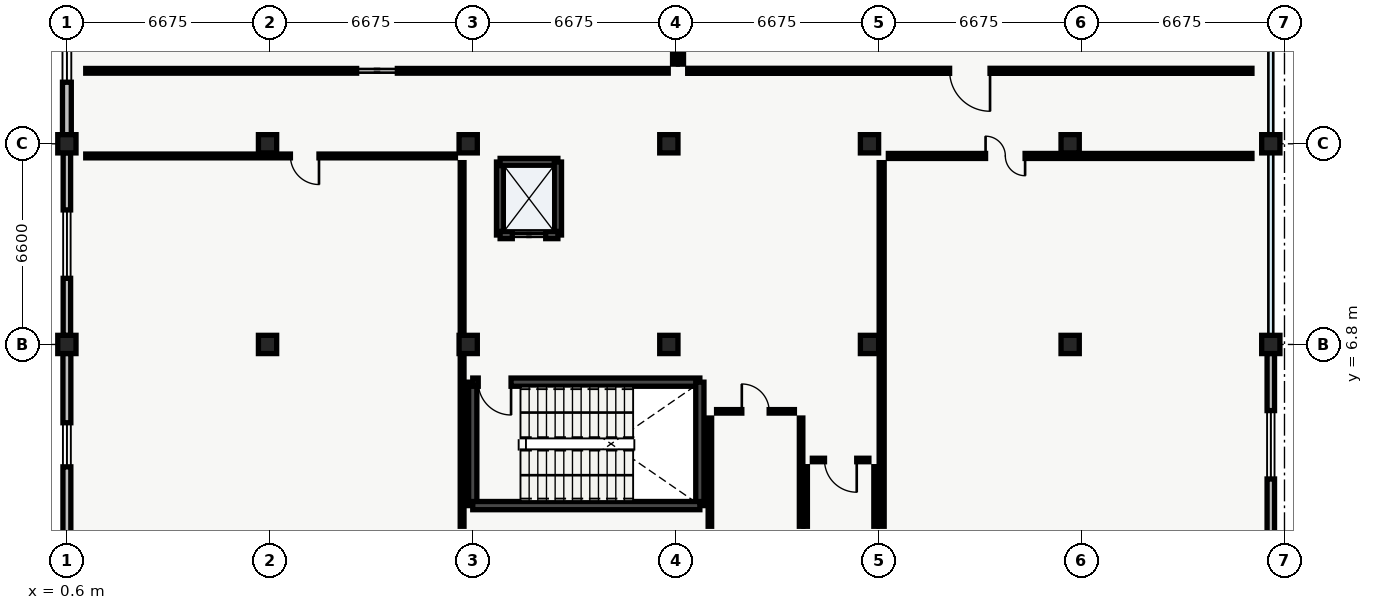
"""IFC4 building model, lengths in metres.
Left out: names, types, materials, properties, quantities, classifications, styles, units other than length and angle.
Written with IfcOpenShell. Run it as: python <this file> out.ifc"""

import sys

from ifc_helpers import new_model, si_unit, direction, frame, frame_2d, origin, origin_2d, place, context, subcontext, project, spatial, rectangle, extrude, element, fill, save


model = new_model("IFC4")
c1 = context("Model", 3, precision=1e-05, world=origin(), true_north=direction((0.0, 1.0)))
c2 = subcontext(c1, "Body", "Model", "MODEL_VIEW")
j1 = project(units=[si_unit("LENGTHUNIT", "METRE"), si_unit("PLANEANGLEUNIT", "RADIAN")], contexts=[c1])
p1 = place(None, origin())
s1 = spatial("IfcSite", under=j1, at=p1, CompositionType="ELEMENT")
p2 = place(p1, origin())
s2 = spatial("IfcBuilding", under=s1, at=p2, CompositionType="ELEMENT")
p3 = place(p2, frame((0.0, 0.0, 5.1)))
s3 = spatial("IfcBuildingStorey", under=s2, at=p3, CompositionType="ELEMENT", Elevation=5.1)
for number, where, z_axis, x_axis in (
    (1, (0.6, 6.8, 0.0), (0.0, 0.0, 1.0), (1.0, 0.0, 0.0)),
    (2, (0.6, 13.4, 0.0), (0.0, 0.0, 1.0), (1.0, 0.0, 0.0)),
    (3, (7.2, 6.8, 0.0), (0.0, 0.0, 1.0), (1.0, 0.0, 0.0)),
    (4, (7.2, 13.4, 0.0), (0.0, 0.0, 1.0), (1.0, 0.0, 0.0)),
    (5, (13.8, 6.8, 0.0), (0.0, 0.0, 1.0), (1.0, 0.0, 0.0)),
    (6, (13.8, 13.4, 0.0), (0.0, 0.0, 1.0), (1.0, 0.0, 0.0)),
    (7, (20.4, 6.8, 0.0), (0.0, 0.0, 1.0), (1.0, 0.0, 0.0)),
    (8, (20.4, 13.4, 0.0), (0.0, 0.0, 1.0), (1.0, 0.0, 0.0)),
    (9, (27.0, 6.8, 0.0), (0.0, 0.0, 1.0), (1.0, 0.0, 0.0)),
    (10, (27.0, 13.4, 0.0), (0.0, 0.0, 1.0), (1.0, 0.0, 0.0)),
    (11, (33.6, 6.8, 0.0), (0.0, 0.0, 1.0), (1.0, 0.0, 0.0)),
    (12, (33.6, 13.4, 0.0), (0.0, 0.0, 1.0), (1.0, 0.0, 0.0)),
    (13, (40.2, 6.8, 0.0), (0.0, 0.0, 1.0), (1.0, 0.0, 0.0)),
    (14, (40.2, 13.4, 0.0), (0.0, 0.0, 1.0), (1.0, 0.0, 0.0)),
):
    element("IfcColumn", number, at=place(p3, frame(where, z_axis=z_axis, x_axis=x_axis)), inside=s3, PredefinedType="COLUMN", context=c2, shape_type="SweptSolid", body=[
        extrude(rectangle(XDim=0.6, YDim=0.6, at=origin_2d()), origin(), (0.0, 0.0, 1.0), 4.3),
    ])
p4 = place(p3, frame((0.6, 0.495, 0.0), z_axis=(0.0, 0.0, 1.0), x_axis=(0.0, 1.0, 0.0)))
e15 = element("IfcWall", 15, at=p4, inside=s3, PredefinedType="STANDARD", context=c2, shape_type="SweptSolid", body=[
    extrude(rectangle(XDim=6.01, YDim=0.26, at=frame_2d((3.005, 0.0))), origin(), (0.0, 0.0, 1.0), 3.785),
])
p5 = place(p4, frame((2.28, 0.0, 0.95)))
e16 = element("IfcOpeningElement", 16, at=p5, cuts=e15, PredefinedType="OPENING", context=c2, shape_type="SweptSolid", body=[
    extrude(rectangle(XDim=1.45, YDim=1.35, at=frame_2d((0.725, 0.675))), frame((0.0, 0.13, 0.0), z_axis=(0.0, -1.0, 0.0), x_axis=(1.0, 0.0, 0.0)), (0.0, 0.0, 1.0), 0.26),
])
p6 = place(p3, frame((0.6, 7.095, 0.0), z_axis=(0.0, 0.0, 1.0), x_axis=(0.0, 1.0, 0.0)))
e17 = element("IfcWall", 17, at=p6, inside=s3, PredefinedType="STANDARD", context=c2, shape_type="SweptSolid", body=[
    extrude(rectangle(XDim=6.01, YDim=0.245, at=frame_2d((3.005, 0.0))), origin(), (0.0, 0.0, 1.0), 3.785),
])
p7 = place(p6, frame((1.88, 0.0, 0.95)))
e18 = element("IfcOpeningElement", 18, at=p7, cuts=e17, PredefinedType="OPENING", context=c2, shape_type="SweptSolid", body=[
    extrude(rectangle(XDim=2.25, YDim=1.55, at=frame_2d((1.125, 0.775))), frame((0.0, 0.123, 0.0), z_axis=(0.0, -1.0, 0.0), x_axis=(1.0, 0.0, 0.0)), (0.0, 0.0, 1.0), 0.245),
])
p8 = place(p3, frame((0.6, 13.695, 0.0), z_axis=(0.0, 0.0, 1.0), x_axis=(0.0, 1.0, 0.0)))
e19 = element("IfcWall", 19, at=p8, inside=s3, PredefinedType="STANDARD", context=c2, shape_type="SweptSolid", body=[
    extrude(rectangle(XDim=6.01, YDim=0.29, at=frame_2d((3.005, 0.0))), origin(), (0.0, 0.0, 1.0), 3.785),
])
p9 = place(p8, frame((1.73, 0.0, 0.95)))
e20 = element("IfcOpeningElement", 20, at=p9, cuts=e19, PredefinedType="OPENING", context=c2, shape_type="SweptSolid", body=[
    extrude(rectangle(XDim=2.55, YDim=1.75, at=frame_2d((1.275, 0.875))), frame((0.0, 0.145, 0.0), z_axis=(0.0, -1.0, 0.0), x_axis=(1.0, 0.0, 0.0)), (0.0, 0.0, 1.0), 0.29),
])
p10 = place(p3, frame((40.2, 6.505, 0.0), z_axis=(0.0, 0.0, 1.0), x_axis=(0.0, -1.0, 0.0)))
e21 = element("IfcWall", 21, at=p10, inside=s3, PredefinedType="STANDARD", context=c2, shape_type="SweptSolid", body=[
    extrude(rectangle(XDim=6.01, YDim=0.245, at=frame_2d((3.005, 0.0))), origin(), (0.0, 0.0, 1.0), 3.785),
])
p11 = place(p10, frame((1.88, 0.0, 0.95)))
e22 = element("IfcOpeningElement", 22, at=p11, cuts=e21, PredefinedType="OPENING", context=c2, shape_type="SweptSolid", body=[
    extrude(rectangle(XDim=2.25, YDim=1.55, at=frame_2d((1.125, 0.775))), frame((0.0, 0.123, 0.0), z_axis=(0.0, -1.0, 0.0), x_axis=(1.0, 0.0, 0.0)), (0.0, 0.0, 1.0), 0.245),
])
p12 = place(p3, frame((13.95, 1.5, 0.0), z_axis=(0.0, 0.0, 1.0), x_axis=(0.0, 1.0, 0.0)))
e23 = element("IfcWall", 23, at=p12, inside=s3, PredefinedType="SHEAR", context=c2, shape_type="SweptSolid", body=[
    extrude(rectangle(XDim=4.06, YDim=0.27, at=frame_2d((2.03, 0.0))), origin(), (0.0, 0.0, 1.0), 4.28),
])
p13 = place(p3, frame((13.95, 5.56, 0.0), z_axis=(0.0, 0.0, 1.0), x_axis=(1.0, 0.0, 0.0)))
e24 = element("IfcWall", 24, at=p13, inside=s3, PredefinedType="SHEAR", context=c2, shape_type="SweptSolid", body=[
    extrude(rectangle(XDim=7.47, YDim=0.27, at=frame_2d((3.735, 0.0))), origin(), (0.0, 0.0, 1.0), 4.28),
])
p14 = place(p13, frame((0.18, 0.0, 0.0)))
e25 = element("IfcOpeningElement", 25, at=p14, cuts=e24, PredefinedType="OPENING", context=c2, shape_type="SweptSolid", body=[
    extrude(rectangle(XDim=1.08, YDim=2.15, at=frame_2d((0.54, 1.075))), frame((0.0, 0.135, 0.0), z_axis=(0.0, -1.0, 0.0), x_axis=(1.0, 0.0, 0.0)), (0.0, 0.0, 1.0), 0.27),
])
p15 = place(p3, frame((21.42, 5.56, 0.0), z_axis=(0.0, 0.0, 1.0), x_axis=(0.0, -1.0, 0.0)))
e26 = element("IfcWall", 26, at=p15, inside=s3, PredefinedType="SHEAR", context=c2, shape_type="SweptSolid", body=[
    extrude(rectangle(XDim=4.06, YDim=0.27, at=frame_2d((2.03, 0.0))), origin(), (0.0, 0.0, 1.0), 4.28),
])
p16 = place(p3, frame((21.42, 1.5, 0.0), z_axis=(0.0, 0.0, 1.0), x_axis=(-1.0, 0.0, 0.0)))
e27 = element("IfcWall", 27, at=p16, inside=s3, PredefinedType="SHEAR", context=c2, shape_type="SweptSolid", body=[
    extrude(rectangle(XDim=7.47, YDim=0.27, at=frame_2d((3.735, 0.0))), origin(), (0.0, 0.0, 1.0), 4.28),
])
p17 = place(p3, frame((14.85, 10.4, 0.0), z_axis=(0.0, 0.0, 1.0), x_axis=(0.0, 1.0, 0.0)))
e28 = element("IfcWall", 28, at=p17, inside=s3, PredefinedType="SHEAR", context=c2, shape_type="SweptSolid", body=[
    extrude(rectangle(XDim=2.4, YDim=0.24, at=frame_2d((1.2, 0.0))), origin(), (0.0, 0.0, 1.0), 4.28),
])
p18 = place(p3, frame((14.85, 12.8, 0.0), z_axis=(0.0, 0.0, 1.0), x_axis=(1.0, 0.0, 0.0)))
e29 = element("IfcWall", 29, at=p18, inside=s3, PredefinedType="SHEAR", context=c2, shape_type="SweptSolid", body=[
    extrude(rectangle(XDim=1.9, YDim=0.24, at=frame_2d((0.95, 0.0))), origin(), (0.0, 0.0, 1.0), 4.28),
])
p19 = place(p3, frame((16.75, 12.8, 0.0), z_axis=(0.0, 0.0, 1.0), x_axis=(0.0, -1.0, 0.0)))
e30 = element("IfcWall", 30, at=p19, inside=s3, PredefinedType="SHEAR", context=c2, shape_type="SweptSolid", body=[
    extrude(rectangle(XDim=2.4, YDim=0.24, at=frame_2d((1.2, 0.0))), origin(), (0.0, 0.0, 1.0), 4.28),
])
p20 = place(p3, frame((16.75, 10.4, 0.0), z_axis=(0.0, 0.0, 1.0), x_axis=(-1.0, 0.0, 0.0)))
e31 = element("IfcWall", 31, at=p20, inside=s3, PredefinedType="SHEAR", context=c2, shape_type="SweptSolid", body=[
    extrude(rectangle(XDim=1.9, YDim=0.24, at=frame_2d((0.95, 0.0))), origin(), (0.0, 0.0, 1.0), 4.28),
])
p21 = place(p20, frame((0.4, 0.0, 0.0)))
e32 = element("IfcOpeningElement", 32, at=p21, cuts=e31, PredefinedType="OPENING", context=c2, shape_type="SweptSolid", body=[
    extrude(rectangle(XDim=1.1, YDim=2.2, at=frame_2d((0.55, 1.1))), frame((0.0, 0.12, 0.0), z_axis=(0.0, -1.0, 0.0), x_axis=(1.0, 0.0, 0.0)), (0.0, 0.0, 1.0), 0.24),
])
p22 = place(p3, frame((24.75, 0.82, 0.0), z_axis=(0.0, 0.0, 1.0), x_axis=(0.0, 1.0, 0.0)))
e33 = element("IfcWall", 33, at=p22, inside=s3, PredefinedType="PARTITIONING", context=c2, shape_type="SweptSolid", body=[
    extrude(rectangle(XDim=3.56, YDim=0.115, at=frame_2d((1.78, 0.0))), origin(), (0.0, 0.0, 1.0), 3.95),
])
p23 = place(p3, frame((24.53, 4.6, 0.0), z_axis=(0.0, 0.0, 1.0), x_axis=(-1.0, 0.0, 0.0)))
e34 = element("IfcWall", 34, at=p23, inside=s3, PredefinedType="PARTITIONING", context=c2, shape_type="SweptSolid", body=[
    extrude(rectangle(XDim=2.56, YDim=0.115, at=frame_2d((1.28, 0.0))), origin(), (0.0, 0.0, 1.0), 3.95),
])
p24 = place(p23, frame((0.83, 0.0, 0.0)))
e35 = element("IfcOpeningElement", 35, at=p24, cuts=e34, PredefinedType="OPENING", context=c2, shape_type="SweptSolid", body=[
    extrude(rectangle(XDim=0.9, YDim=2.1, at=frame_2d((0.45, 1.05))), frame((0.0, 0.058, 0.0), z_axis=(0.0, -1.0, 0.0), x_axis=(1.0, 0.0, 0.0)), (0.0, 0.0, 1.0), 0.115),
])
p25 = place(p3, frame((21.75, 4.38, 0.0), z_axis=(0.0, 0.0, 1.0), x_axis=(0.0, -1.0, 0.0)))
e36 = element("IfcWall", 36, at=p25, inside=s3, PredefinedType="PARTITIONING", context=c2, shape_type="SweptSolid", body=[
    extrude(rectangle(XDim=3.56, YDim=0.115, at=frame_2d((1.78, 0.0))), origin(), (0.0, 0.0, 1.0), 3.95),
])
p26 = place(p3, frame((27.2, 0.82, 0.0), z_axis=(0.0, 0.0, 1.0), x_axis=(0.0, 1.0, 0.0)))
e37 = element("IfcWall", 37, at=p26, inside=s3, PredefinedType="PARTITIONING", context=c2, shape_type="SweptSolid", body=[
    extrude(rectangle(XDim=1.96, YDim=0.115, at=frame_2d((0.98, 0.0))), origin(), (0.0, 0.0, 1.0), 3.635),
])
p27 = place(p3, frame((26.98, 3.0, 0.0), z_axis=(0.0, 0.0, 1.0), x_axis=(-1.0, 0.0, 0.0)))
e38 = element("IfcWall", 38, at=p27, inside=s3, PredefinedType="PARTITIONING", context=c2, shape_type="SweptSolid", body=[
    extrude(rectangle(XDim=1.86, YDim=0.115, at=frame_2d((0.93, 0.0))), origin(), (0.0, 0.0, 1.0), 3.95),
])
p28 = place(p27, frame((0.4, 0.0, 0.0)))
e39 = element("IfcOpeningElement", 39, at=p28, cuts=e38, PredefinedType="OPENING", context=c2, shape_type="SweptSolid", body=[
    extrude(rectangle(XDim=1.06, YDim=2.12, at=frame_2d((0.53, 1.06))), frame((0.0, 0.058, 0.0), z_axis=(0.0, -1.0, 0.0), x_axis=(1.0, 0.0, 0.0)), (0.0, 0.0, 1.0), 0.115),
])
p29 = place(p3, frame((24.9, 2.78, 0.0), z_axis=(0.0, 0.0, 1.0), x_axis=(0.0, -1.0, 0.0)))
e40 = element("IfcWall", 40, at=p29, inside=s3, PredefinedType="PARTITIONING", context=c2, shape_type="SweptSolid", body=[
    extrude(rectangle(XDim=1.96, YDim=0.115, at=frame_2d((0.98, 0.0))), origin(), (0.0, 0.0, 1.0), 3.95),
])
p30 = place(p3, frame((1.22, 15.8, 0.0), z_axis=(0.0, 0.0, 1.0), x_axis=(1.0, 0.0, 0.0)))
e41 = element("IfcWall", 41, at=p30, inside=s3, PredefinedType="PARTITIONING", context=c2, shape_type="SweptSolid", body=[
    extrude(rectangle(XDim=19.16, YDim=0.155, at=frame_2d((9.58, 0.0))), origin(), (0.0, 0.0, 1.0), 3.95),
])
p31 = place(p30, frame((8.91, 0.0, 0.0)))
e42 = element("IfcOpeningElement", 42, at=p31, cuts=e41, PredefinedType="OPENING", context=c2, shape_type="SweptSolid", body=[
    extrude(rectangle(XDim=1.34, YDim=2.2, at=frame_2d((0.67, 1.1))), frame((0.0, 0.078, 0.0), z_axis=(0.0, -1.0, 0.0), x_axis=(1.0, 0.0, 0.0)), (0.0, 0.0, 1.0), 0.155),
])
p32 = place(p3, frame((20.6, 16.02, 0.0), z_axis=(0.0, 0.0, 1.0), x_axis=(0.0, 1.0, 0.0)))
e43 = element("IfcWall", 43, at=p32, inside=s3, PredefinedType="PARTITIONING", context=c2, shape_type="SweptSolid", body=[
    extrude(rectangle(XDim=9.96, YDim=0.155, at=frame_2d((4.98, 0.0))), origin(), (0.0, 0.0, 1.0), 3.635),
])
p33 = place(p3, frame((21.02, 15.8, 0.0), z_axis=(0.0, 0.0, 1.0), x_axis=(1.0, 0.0, 0.0)))
e44 = element("IfcWall", 44, at=p33, inside=s3, PredefinedType="PARTITIONING", context=c2, shape_type="SweptSolid", body=[
    extrude(rectangle(XDim=18.56, YDim=0.165, at=frame_2d((9.28, 0.0))), origin(), (0.0, 0.0, 1.0), 3.95),
])
p34 = place(p33, frame((8.615, 0.0, 0.0)))
e45 = element("IfcOpeningElement", 45, at=p34, cuts=e44, PredefinedType="OPENING", context=c2, shape_type="SweptSolid", body=[
    extrude(rectangle(XDim=1.33, YDim=2.12, at=frame_2d((0.665, 1.06))), frame((0.0, 0.083, 0.0), z_axis=(0.0, -1.0, 0.0), x_axis=(1.0, 0.0, 0.0)), (0.0, 0.0, 1.0), 0.165),
])
p35 = place(p3, frame((20.8, 25.98, 0.0), z_axis=(0.0, 0.0, 1.0), x_axis=(0.0, -1.0, 0.0)))
e46 = element("IfcWall", 46, at=p35, inside=s3, PredefinedType="PARTITIONING", context=c2, shape_type="SweptSolid", body=[
    extrude(rectangle(XDim=9.96, YDim=0.165, at=frame_2d((4.98, 0.0))), origin(), (0.0, 0.0, 1.0), 3.95),
])
p36 = place(p3, frame((13.6, 0.82, 0.0), z_axis=(0.0, 0.0, 1.0), x_axis=(0.0, 1.0, 0.0)))
e47 = element("IfcWall", 47, at=p36, inside=s3, PredefinedType="PARTITIONING", context=c2, shape_type="SweptSolid", body=[
    extrude(rectangle(XDim=11.96, YDim=0.125, at=frame_2d((5.98, 0.0))), origin(), (0.0, 0.0, 1.0), 3.635),
])
p37 = place(p3, frame((13.38, 13.0, 0.0), z_axis=(0.0, 0.0, 1.0), x_axis=(-1.0, 0.0, 0.0)))
e48 = element("IfcWall", 48, at=p37, inside=s3, PredefinedType="PARTITIONING", context=c2, shape_type="SweptSolid", body=[
    extrude(rectangle(XDim=12.16, YDim=0.125, at=frame_2d((6.08, 0.0))), origin(), (0.0, 0.0, 1.0), 3.95),
])
p38 = place(p37, frame((4.488, 0.0, 0.0)))
e49 = element("IfcOpeningElement", 49, at=p38, cuts=e48, PredefinedType="OPENING", context=c2, shape_type="SweptSolid", body=[
    extrude(rectangle(XDim=0.94, YDim=2.12, at=frame_2d((0.47, 1.06))), frame((0.0, 0.062, 0.0), z_axis=(0.0, -1.0, 0.0), x_axis=(1.0, 0.0, 0.0)), (0.0, 0.0, 1.0), 0.125),
])
p39 = place(p3, frame((39.58, 13.0, 0.0), z_axis=(0.0, 0.0, 1.0), x_axis=(-1.0, 0.0, 0.0)))
e50 = element("IfcWall", 50, at=p39, inside=s3, PredefinedType="PARTITIONING", context=c2, shape_type="SweptSolid", body=[
    extrude(rectangle(XDim=11.96, YDim=0.165, at=frame_2d((5.98, 0.0))), origin(), (0.0, 0.0, 1.0), 3.95),
])
p40 = place(p39, frame((7.462, 0.0, 0.0)))
e51 = element("IfcOpeningElement", 51, at=p40, cuts=e50, PredefinedType="OPENING", context=c2, shape_type="SweptSolid", body=[
    extrude(rectangle(XDim=1.3, YDim=2.18, at=frame_2d((0.65, 1.09))), frame((0.0, 0.083, 0.0), z_axis=(0.0, -1.0, 0.0), x_axis=(1.0, 0.0, 0.0)), (0.0, 0.0, 1.0), 0.165),
])
p41 = place(p3, frame((27.4, 12.78, 0.0), z_axis=(0.0, 0.0, 1.0), x_axis=(0.0, -1.0, 0.0)))
e52 = element("IfcWall", 52, at=p41, inside=s3, PredefinedType="PARTITIONING", context=c2, shape_type="SweptSolid", body=[
    extrude(rectangle(XDim=11.96, YDim=0.165, at=frame_2d((5.98, 0.0))), origin(), (0.0, 0.0, 1.0), 3.95),
])
p42 = place(p5, origin())
e53 = element("IfcWindow", 53, at=p42, inside=s3, PartitioningType="SINGLE_PANEL", PredefinedType="WINDOW", context=c2, shape_type="SweptSolid", body=[
    extrude(rectangle(XDim=1.45, YDim=1.35, at=frame_2d((0.725, 0.675))), frame((0.0, 0.03, 0.0), z_axis=(0.0, -1.0, 0.0), x_axis=(1.0, 0.0, 0.0)), (0.0, 0.0, 1.0), 0.06),
])
fill(e16, e53)
p43 = place(p7, origin())
e54 = element("IfcWindow", 54, at=p43, inside=s3, PartitioningType="SINGLE_PANEL", PredefinedType="WINDOW", context=c2, shape_type="SweptSolid", body=[
    extrude(rectangle(XDim=2.25, YDim=1.55, at=frame_2d((1.125, 0.775))), frame((0.0, 0.03, 0.0), z_axis=(0.0, -1.0, 0.0), x_axis=(1.0, 0.0, 0.0)), (0.0, 0.0, 1.0), 0.06),
])
fill(e18, e54)
p44 = place(p9, origin())
e55 = element("IfcWindow", 55, at=p44, inside=s3, PartitioningType="SINGLE_PANEL", PredefinedType="WINDOW", context=c2, shape_type="SweptSolid", body=[
    extrude(rectangle(XDim=2.55, YDim=1.75, at=frame_2d((1.275, 0.875))), frame((0.0, 0.03, 0.0), z_axis=(0.0, -1.0, 0.0), x_axis=(1.0, 0.0, 0.0)), (0.0, 0.0, 1.0), 0.06),
])
fill(e20, e55)
p45 = place(p11, origin())
e56 = element("IfcWindow", 56, at=p45, inside=s3, PartitioningType="SINGLE_PANEL", PredefinedType="WINDOW", context=c2, shape_type="SweptSolid", body=[
    extrude(rectangle(XDim=2.25, YDim=1.55, at=frame_2d((1.125, 0.775))), frame((0.0, 0.03, 0.0), z_axis=(0.0, -1.0, 0.0), x_axis=(1.0, 0.0, 0.0)), (0.0, 0.0, 1.0), 0.06),
])
fill(e22, e56)
p46 = place(p14, origin())
e57 = element("IfcDoor", 57, at=p46, inside=s3, OperationType="SINGLE_SWING_RIGHT", PredefinedType="DOOR", context=c2, shape_type="SweptSolid", body=[
    extrude(rectangle(XDim=1.08, YDim=2.15, at=frame_2d((0.54, 1.075))), frame((0.0, 0.025, 0.0), z_axis=(0.0, -1.0, 0.0), x_axis=(1.0, 0.0, 0.0)), (0.0, 0.0, 1.0), 0.05),
])
fill(e25, e57)
p47 = place(p21, origin())
e58 = element("IfcDoor", 58, at=p47, inside=s3, OperationType="SLIDING_TO_LEFT", PredefinedType="DOOR", context=c2, shape_type="SweptSolid", body=[
    extrude(rectangle(XDim=1.1, YDim=2.2, at=frame_2d((0.55, 1.1))), frame((0.0, 0.025, 0.0), z_axis=(0.0, -1.0, 0.0), x_axis=(1.0, 0.0, 0.0)), (0.0, 0.0, 1.0), 0.05),
])
fill(e32, e58)
p48 = place(p24, origin())
e59 = element("IfcDoor", 59, at=p48, inside=s3, OperationType="SINGLE_SWING_RIGHT", PredefinedType="DOOR", context=c2, shape_type="SweptSolid", body=[
    extrude(rectangle(XDim=0.9, YDim=2.1, at=frame_2d((0.45, 1.05))), frame((0.0, 0.025, 0.0), z_axis=(0.0, -1.0, 0.0), x_axis=(1.0, 0.0, 0.0)), (0.0, 0.0, 1.0), 0.05),
])
fill(e35, e59)
p49 = place(p28, origin())
e60 = element("IfcDoor", 60, at=p49, inside=s3, OperationType="SINGLE_SWING_LEFT", PredefinedType="DOOR", context=c2, shape_type="SweptSolid", body=[
    extrude(rectangle(XDim=1.06, YDim=2.12, at=frame_2d((0.53, 1.06))), frame((0.0, 0.025, 0.0), z_axis=(0.0, -1.0, 0.0), x_axis=(1.0, 0.0, 0.0)), (0.0, 0.0, 1.0), 0.05),
])
fill(e39, e60)
p50 = place(p31, origin())
e61 = element("IfcDoor", 61, at=p50, inside=s3, OperationType="SLIDING_TO_RIGHT", PredefinedType="DOOR", context=c2, shape_type="SweptSolid", body=[
    extrude(rectangle(XDim=1.34, YDim=2.2, at=frame_2d((0.67, 1.1))), frame((0.0, 0.025, 0.0), z_axis=(0.0, -1.0, 0.0), x_axis=(1.0, 0.0, 0.0)), (0.0, 0.0, 1.0), 0.05),
])
fill(e42, e61)
p51 = place(p34, origin())
e62 = element("IfcDoor", 62, at=p51, inside=s3, OperationType="SINGLE_SWING_RIGHT", PredefinedType="DOOR", context=c2, shape_type="SweptSolid", body=[
    extrude(rectangle(XDim=1.33, YDim=2.12, at=frame_2d((0.665, 1.06))), frame((0.0, 0.025, 0.0), z_axis=(0.0, -1.0, 0.0), x_axis=(1.0, 0.0, 0.0)), (0.0, 0.0, 1.0), 0.05),
])
fill(e45, e62)
p52 = place(p38, origin())
e63 = element("IfcDoor", 63, at=p52, inside=s3, OperationType="SINGLE_SWING_LEFT", PredefinedType="DOOR", context=c2, shape_type="SweptSolid", body=[
    extrude(rectangle(XDim=0.94, YDim=2.12, at=frame_2d((0.47, 1.06))), frame((0.0, 0.025, 0.0), z_axis=(0.0, -1.0, 0.0), x_axis=(1.0, 0.0, 0.0)), (0.0, 0.0, 1.0), 0.05),
])
fill(e49, e63)
p53 = place(p40, origin())
e64 = element("IfcDoor", 64, at=p53, inside=s3, OperationType="DOUBLE_DOOR_SINGLE_SWING", PredefinedType="DOOR", context=c2, shape_type="SweptSolid", body=[
    extrude(rectangle(XDim=1.3, YDim=2.18, at=frame_2d((0.65, 1.09))), frame((0.0, 0.025, 0.0), z_axis=(0.0, -1.0, 0.0), x_axis=(1.0, 0.0, 0.0)), (0.0, 0.0, 1.0), 0.05),
])
fill(e51, e64)
save(model, sys.argv[1])
